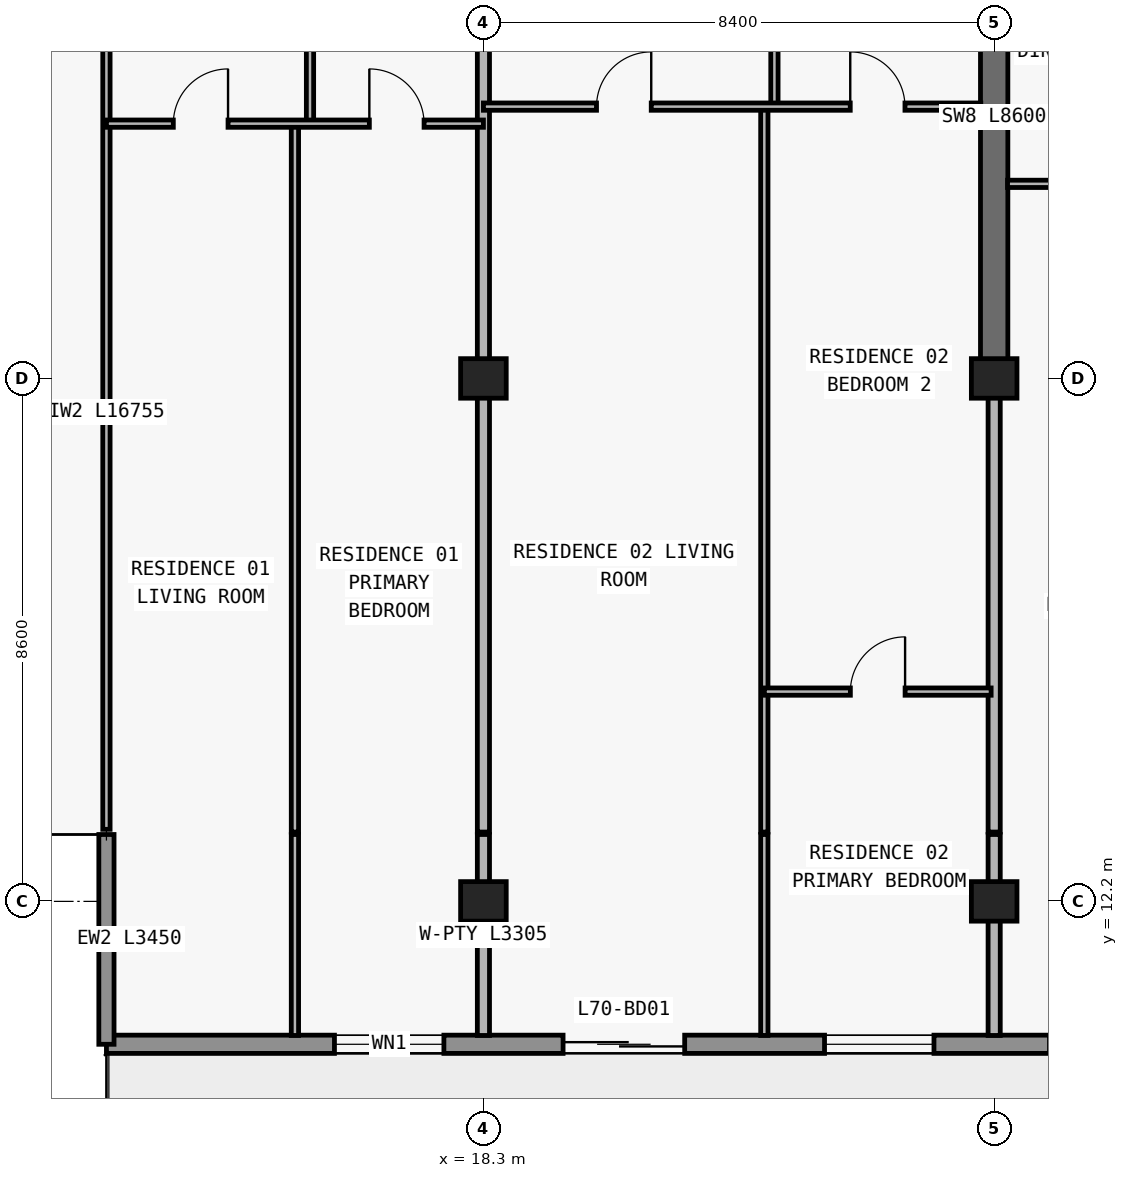
"""IFC4 building model, lengths in metres.
Left out: names, types, materials, properties, quantities, classifications, styles, units other than length and angle.
Written with IfcOpenShell. Run it as: python <this file> out.ifc"""

import sys

from ifc_helpers import new_model, si_unit, direction, frame, frame_2d, origin, origin_2d, place, context, subcontext, project, spatial, rectangle, extrude, element, fill, save


model = new_model("IFC4")
c1 = context("Model", 3, precision=1e-05, world=origin(), true_north=direction((0.0, 1.0)))
c2 = subcontext(c1, "Body", "Model", "MODEL_VIEW")
j1 = project(units=[si_unit("LENGTHUNIT", "METRE"), si_unit("PLANEANGLEUNIT", "RADIAN")], contexts=[c1])
p1 = place(None, origin())
s1 = spatial("IfcSite", under=j1, at=p1, CompositionType="ELEMENT")
p2 = place(p1, origin())
s2 = spatial("IfcBuilding", under=s1, at=p2, CompositionType="ELEMENT")
p3 = place(p2, frame((0.0, 0.0, 249.6)))
s3 = spatial("IfcBuildingStorey", under=s2, at=p3, CompositionType="ELEMENT", Elevation=249.6)
for number, where, z_axis, x_axis in (
    (1, (18.3, 12.2, 0.0), (0.0, 0.0, 1.0), (1.0, 0.0, 0.0)),
    (2, (26.7, 12.2, 0.0), (0.0, 0.0, 1.0), (1.0, 0.0, 0.0)),
    (3, (18.3, 20.8, 0.0), (0.0, 0.0, 1.0), (1.0, 0.0, 0.0)),
    (4, (26.7, 20.8, 0.0), (0.0, 0.0, 1.0), (1.0, 0.0, 0.0)),
):
    element("IfcColumn", number, at=place(p3, frame(where, z_axis=z_axis, x_axis=x_axis)), inside=s3, PredefinedType="COLUMN", context=c2, shape_type="SweptSolid", body=[
        extrude(rectangle(XDim=0.75, YDim=0.65, at=origin_2d()), origin(), (0.0, 0.0, 1.0), 3.05),
    ])
p4 = place(p3, frame((26.7, 20.8, 0.0), z_axis=(0.0, 0.0, 1.0), x_axis=(0.0, 1.0, 0.0)))
e5 = element("IfcWall", 5, at=p4, inside=s3, PredefinedType="SHEAR", context=c2, shape_type="SweptSolid", body=[
    extrude(rectangle(XDim=8.6, YDim=0.45, at=frame_2d((4.3, 0.0))), origin(), (0.0, 0.0, 1.0), 3.05),
])
p5 = place(p3, frame((65.7, 9.85, 0.0), z_axis=(0.0, 0.0, 1.0), x_axis=(-1.0, 0.0, 0.0)))
e6 = element("IfcWall", 6, at=p5, inside=s3, PredefinedType="STANDARD", context=c2, shape_type="SweptSolid", body=[
    extrude(rectangle(XDim=53.6, YDim=0.3, at=frame_2d((26.8, 0.0))), origin(), (0.0, 0.0, 1.0), 3.05),
])
p6 = place(p5, frame((48.05, 0.0, 0.85)))
e7 = element("IfcOpeningElement", 7, at=p6, cuts=e6, PredefinedType="OPENING", context=c2, shape_type="SweptSolid", body=[
    extrude(rectangle(XDim=1.8, YDim=1.55, at=frame_2d((0.9, 0.775))), frame((0.0, 0.16, 0.0), z_axis=(0.0, -1.0, 0.0), x_axis=(1.0, 0.0, 0.0)), (0.0, 0.0, 1.0), 0.32),
])
p7 = place(p5, frame((44.09, 0.0, 0.0)))
e8 = element("IfcOpeningElement", 8, at=p7, cuts=e6, PredefinedType="OPENING", context=c2, shape_type="SweptSolid", body=[
    extrude(rectangle(XDim=2.0, YDim=2.3, at=frame_2d((1.0, 1.15))), frame((0.0, 0.16, 0.0), z_axis=(0.0, -1.0, 0.0), x_axis=(1.0, 0.0, 0.0)), (0.0, 0.0, 1.0), 0.32),
])
p8 = place(p5, frame((39.99, 0.0, 0.85)))
e9 = element("IfcOpeningElement", 9, at=p8, cuts=e6, PredefinedType="OPENING", context=c2, shape_type="SweptSolid", body=[
    extrude(rectangle(XDim=1.8, YDim=1.55, at=frame_2d((0.9, 0.775))), frame((0.0, 0.16, 0.0), z_axis=(0.0, -1.0, 0.0), x_axis=(1.0, 0.0, 0.0)), (0.0, 0.0, 1.0), 0.32),
])
p9 = place(p5, frame((36.09, 0.0, 0.0)))
e10 = element("IfcOpeningElement", 10, at=p9, cuts=e6, PredefinedType="OPENING", context=c2, shape_type="SweptSolid", body=[
    extrude(rectangle(XDim=2.0, YDim=2.3, at=frame_2d((1.0, 1.15))), frame((0.0, 0.16, 0.0), z_axis=(0.0, -1.0, 0.0), x_axis=(1.0, 0.0, 0.0)), (0.0, 0.0, 1.0), 0.32),
])
p10 = place(p5, frame((31.41, 0.0, 0.65)))
e11 = element("IfcOpeningElement", 11, at=p10, cuts=e6, PredefinedType="OPENING", context=c2, shape_type="SweptSolid", body=[
    extrude(rectangle(XDim=2.6, YDim=1.85, at=frame_2d((1.3, 0.925))), frame((0.0, 0.16, 0.0), z_axis=(0.0, -1.0, 0.0), x_axis=(1.0, 0.0, 0.0)), (0.0, 0.0, 1.0), 0.32),
])
p11 = place(p5, frame((25.7, 0.0, 0.85)))
e12 = element("IfcOpeningElement", 12, at=p11, cuts=e6, PredefinedType="OPENING", context=c2, shape_type="SweptSolid", body=[
    extrude(rectangle(XDim=2.2, YDim=1.55, at=frame_2d((1.1, 0.775))), frame((0.0, 0.16, 0.0), z_axis=(0.0, -1.0, 0.0), x_axis=(1.0, 0.0, 0.0)), (0.0, 0.0, 1.0), 0.32),
])
p12 = place(p5, frame((17.7, 0.0, 0.85)))
e13 = element("IfcOpeningElement", 13, at=p12, cuts=e6, PredefinedType="OPENING", context=c2, shape_type="SweptSolid", body=[
    extrude(rectangle(XDim=2.2, YDim=1.55, at=frame_2d((1.1, 0.775))), frame((0.0, 0.16, 0.0), z_axis=(0.0, -1.0, 0.0), x_axis=(1.0, 0.0, 0.0)), (0.0, 0.0, 1.0), 0.32),
])
p13 = place(p5, frame((11.69, 0.0, 0.0)))
e14 = element("IfcOpeningElement", 14, at=p13, cuts=e6, PredefinedType="OPENING", context=c2, shape_type="SweptSolid", body=[
    extrude(rectangle(XDim=2.0, YDim=2.3, at=frame_2d((1.0, 1.15))), frame((0.0, 0.16, 0.0), z_axis=(0.0, -1.0, 0.0), x_axis=(1.0, 0.0, 0.0)), (0.0, 0.0, 1.0), 0.32),
])
p14 = place(p5, frame((7.01, 0.0, 0.65)))
e15 = element("IfcOpeningElement", 15, at=p14, cuts=e6, PredefinedType="OPENING", context=c2, shape_type="SweptSolid", body=[
    extrude(rectangle(XDim=2.6, YDim=1.85, at=frame_2d((1.3, 0.925))), frame((0.0, 0.16, 0.0), z_axis=(0.0, -1.0, 0.0), x_axis=(1.0, 0.0, 0.0)), (0.0, 0.0, 1.0), 0.32),
])
p15 = place(p5, frame((2.0, 0.0, 0.85)))
e16 = element("IfcOpeningElement", 16, at=p15, cuts=e6, PredefinedType="OPENING", context=c2, shape_type="SweptSolid", body=[
    extrude(rectangle(XDim=2.2, YDim=1.55, at=frame_2d((1.1, 0.775))), frame((0.0, 0.16, 0.0), z_axis=(0.0, -1.0, 0.0), x_axis=(1.0, 0.0, 0.0)), (0.0, 0.0, 1.0), 0.32),
])
p16 = place(p3, frame((12.1, 13.3, 0.0), z_axis=(0.0, 0.0, 1.0), x_axis=(0.0, -1.0, 0.0)))
e17 = element("IfcWall", 17, at=p16, inside=s3, PredefinedType="ELEMENTEDWALL", context=c2, shape_type="SweptSolid", body=[
    extrude(rectangle(XDim=3.45, YDim=0.25, at=frame_2d((1.725, 0.0))), origin(), (0.0, 0.0, 1.0), 3.05),
])
p17 = place(p3, frame((12.1, 13.385, 0.0), z_axis=(0.0, 0.0, 1.0), x_axis=(0.0, 1.0, 0.0)))
e18 = element("IfcWall", 18, at=p17, inside=s3, PredefinedType="PARTITIONING", context=c2, shape_type="SweptSolid", body=[
    extrude(rectangle(XDim=16.755, YDim=0.12, at=frame_2d((8.377, 0.0))), origin(), (0.0, 0.0, 1.0), 2.578),
])
p18 = place(p17, frame((13.73, 0.0, 0.0)))
e19 = element("IfcOpeningElement", 19, at=p18, cuts=e18, PredefinedType="OPENING", context=c2, shape_type="SweptSolid", body=[
    extrude(rectangle(XDim=0.9, YDim=2.15, at=frame_2d((0.45, 1.075))), frame((0.0, 0.07, 0.0), z_axis=(0.0, -1.0, 0.0), x_axis=(1.0, 0.0, 0.0)), (0.0, 0.0, 1.0), 0.14),
])
p19 = place(p3, frame((15.2, 9.995, 0.0), z_axis=(0.0, 0.0, 1.0), x_axis=(0.0, 1.0, 0.0)))
e20 = element("IfcWall", 20, at=p19, inside=s3, PredefinedType="PARTITIONING", context=c2, shape_type="SweptSolid", body=[
    extrude(rectangle(XDim=3.305, YDim=0.12, at=frame_2d((1.652, 0.0))), origin(), (0.0, 0.0, 1.0), 3.05),
])
p20 = place(p3, frame((15.2, 13.34, 0.0), z_axis=(0.0, 0.0, 1.0), x_axis=(0.0, 1.0, 0.0)))
e21 = element("IfcWall", 21, at=p20, inside=s3, PredefinedType="PARTITIONING", context=c2, shape_type="SweptSolid", body=[
    extrude(rectangle(XDim=11.65, YDim=0.12, at=frame_2d((5.825, 0.0))), origin(), (0.0, 0.0, 1.0), 3.05),
])
p21 = place(p3, frame((15.448, 24.99, 0.0), z_axis=(0.0, 0.0, 1.0), x_axis=(0.0, 1.0, 0.0)))
e22 = element("IfcWall", 22, at=p21, inside=s3, PredefinedType="PARTITIONING", context=c2, shape_type="SweptSolid", body=[
    extrude(rectangle(XDim=5.15, YDim=0.12, at=frame_2d((2.575, 0.0))), origin(), (0.0, 0.0, 1.0), 3.05),
])
p22 = place(p21, frame((2.125, 0.0, 0.0)))
e23 = element("IfcOpeningElement", 23, at=p22, cuts=e22, PredefinedType="OPENING", context=c2, shape_type="SweptSolid", body=[
    extrude(rectangle(XDim=0.9, YDim=2.15, at=frame_2d((0.45, 1.075))), frame((0.0, 0.07, 0.0), z_axis=(0.0, -1.0, 0.0), x_axis=(1.0, 0.0, 0.0)), (0.0, 0.0, 1.0), 0.14),
])
p23 = place(p3, frame((18.3, 9.995, 0.0), z_axis=(0.0, 0.0, 1.0), x_axis=(0.0, 1.0, 0.0)))
e24 = element("IfcWall", 24, at=p23, inside=s3, PredefinedType="PARTITIONING", context=c2, shape_type="SweptSolid", body=[
    extrude(rectangle(XDim=3.305, YDim=0.2, at=frame_2d((1.652, 0.0))), origin(), (0.0, 0.0, 1.0), 2.263),
])
p24 = place(p3, frame((18.3, 13.34, 0.0), z_axis=(0.0, 0.0, 1.0), x_axis=(0.0, 1.0, 0.0)))
e25 = element("IfcWall", 25, at=p24, inside=s3, PredefinedType="PARTITIONING", context=c2, shape_type="SweptSolid", body=[
    extrude(rectangle(XDim=16.8, YDim=0.2, at=frame_2d((8.4, 0.0))), origin(), (0.0, 0.0, 1.0), 2.263),
])
p25 = place(p3, frame((22.92, 9.995, 0.0), z_axis=(0.0, 0.0, 1.0), x_axis=(0.0, 1.0, 0.0)))
e26 = element("IfcWall", 26, at=p25, inside=s3, PredefinedType="PARTITIONING", context=c2, shape_type="SweptSolid", body=[
    extrude(rectangle(XDim=3.305, YDim=0.12, at=frame_2d((1.652, 0.0))), origin(), (0.0, 0.0, 1.0), 3.05),
])
p26 = place(p3, frame((22.92, 13.34, 0.0), z_axis=(0.0, 0.0, 1.0), x_axis=(0.0, 1.0, 0.0)))
e27 = element("IfcWall", 27, at=p26, inside=s3, PredefinedType="PARTITIONING", context=c2, shape_type="SweptSolid", body=[
    extrude(rectangle(XDim=11.93, YDim=0.12, at=frame_2d((5.965, 0.0))), origin(), (0.0, 0.0, 1.0), 3.05),
])
p27 = place(p3, frame((23.086, 25.275, 0.0), z_axis=(0.0, 0.0, 1.0), x_axis=(0.0, 1.0, 0.0)))
e28 = element("IfcWall", 28, at=p27, inside=s3, PredefinedType="PARTITIONING", context=c2, shape_type="SweptSolid", body=[
    extrude(rectangle(XDim=4.865, YDim=0.12, at=frame_2d((2.433, 0.0))), origin(), (0.0, 0.0, 1.0), 3.05),
])
p28 = place(p27, frame((1.982, 0.0, 0.0)))
e29 = element("IfcOpeningElement", 29, at=p28, cuts=e28, PredefinedType="OPENING", context=c2, shape_type="SweptSolid", body=[
    extrude(rectangle(XDim=0.9, YDim=2.15, at=frame_2d((0.45, 1.075))), frame((0.0, 0.07, 0.0), z_axis=(0.0, -1.0, 0.0), x_axis=(1.0, 0.0, 0.0)), (0.0, 0.0, 1.0), 0.14),
])
p29 = place(p3, frame((26.7, 9.995, 0.0), z_axis=(0.0, 0.0, 1.0), x_axis=(0.0, 1.0, 0.0)))
e30 = element("IfcWall", 30, at=p29, inside=s3, PredefinedType="PARTITIONING", context=c2, shape_type="SweptSolid", body=[
    extrude(rectangle(XDim=3.305, YDim=0.2, at=frame_2d((1.652, 0.0))), origin(), (0.0, 0.0, 1.0), 2.263),
])
p30 = place(p3, frame((26.7, 13.34, 0.0), z_axis=(0.0, 0.0, 1.0), x_axis=(0.0, 1.0, 0.0)))
e31 = element("IfcWall", 31, at=p30, inside=s3, PredefinedType="PARTITIONING", context=c2, shape_type="SweptSolid", body=[
    extrude(rectangle(XDim=7.455, YDim=0.2, at=frame_2d((3.728, 0.0))), origin(), (0.0, 0.0, 1.0), 2.263),
])
p31 = place(p3, frame((22.92, 15.65, 0.0), z_axis=(0.0, 0.0, 1.0), x_axis=(1.0, 0.0, 0.0)))
e32 = element("IfcWall", 32, at=p31, inside=s3, PredefinedType="PARTITIONING", context=c2, shape_type="SweptSolid", body=[
    extrude(rectangle(XDim=3.73, YDim=0.12, at=frame_2d((1.865, 0.0))), origin(), (0.0, 0.0, 1.0), 3.05),
])
p32 = place(p31, frame((1.415, 0.0, 0.0)))
e33 = element("IfcOpeningElement", 33, at=p32, cuts=e32, PredefinedType="OPENING", context=c2, shape_type="SweptSolid", body=[
    extrude(rectangle(XDim=0.9, YDim=2.15, at=frame_2d((0.45, 1.075))), frame((0.0, 0.07, 0.0), z_axis=(0.0, -1.0, 0.0), x_axis=(1.0, 0.0, 0.0)), (0.0, 0.0, 1.0), 0.14),
])
p33 = place(p3, frame((26.92, 24.0, 0.0), z_axis=(0.0, 0.0, 1.0), x_axis=(1.0, 0.0, 0.0)))
e34 = element("IfcWall", 34, at=p33, inside=s3, PredefinedType="PARTITIONING", context=c2, shape_type="SweptSolid", body=[
    extrude(rectangle(XDim=8.18, YDim=0.12, at=frame_2d((4.09, 0.0))), origin(), (0.0, 0.0, 1.0), 3.05),
])
p34 = place(p33, frame((1.33, 0.0, 0.0)))
e35 = element("IfcOpeningElement", 35, at=p34, cuts=e34, PredefinedType="OPENING", context=c2, shape_type="SweptSolid", body=[
    extrude(rectangle(XDim=0.9, YDim=2.15, at=frame_2d((0.45, 1.075))), frame((0.0, 0.07, 0.0), z_axis=(0.0, -1.0, 0.0), x_axis=(1.0, 0.0, 0.0)), (0.0, 0.0, 1.0), 0.14),
])
p35 = place(p3, frame((12.1, 24.99, 0.0), z_axis=(0.0, 0.0, 1.0), x_axis=(1.0, 0.0, 0.0)))
e36 = element("IfcWall", 36, at=p35, inside=s3, PredefinedType="PARTITIONING", context=c2, shape_type="SweptSolid", body=[
    extrude(rectangle(XDim=6.2, YDim=0.12, at=frame_2d((3.1, 0.0))), origin(), (0.0, 0.0, 1.0), 3.05),
])
p36 = place(p35, frame((1.1, 0.0, 0.0)))
e37 = element("IfcOpeningElement", 37, at=p36, cuts=e36, PredefinedType="OPENING", context=c2, shape_type="SweptSolid", body=[
    extrude(rectangle(XDim=0.9, YDim=2.15, at=frame_2d((0.45, 1.075))), frame((0.0, 0.07, 0.0), z_axis=(0.0, -1.0, 0.0), x_axis=(1.0, 0.0, 0.0)), (0.0, 0.0, 1.0), 0.14),
])
p37 = place(p35, frame((4.324, 0.0, 0.0)))
e38 = element("IfcOpeningElement", 38, at=p37, cuts=e36, PredefinedType="OPENING", context=c2, shape_type="SweptSolid", body=[
    extrude(rectangle(XDim=0.9, YDim=2.15, at=frame_2d((0.45, 1.075))), frame((0.0, 0.07, 0.0), z_axis=(0.0, -1.0, 0.0), x_axis=(1.0, 0.0, 0.0)), (0.0, 0.0, 1.0), 0.14),
])
p38 = place(p3, frame((18.3, 25.27, 0.0), z_axis=(0.0, 0.0, 1.0), x_axis=(1.0, 0.0, 0.0)))
e39 = element("IfcWall", 39, at=p38, inside=s3, PredefinedType="PARTITIONING", context=c2, shape_type="SweptSolid", body=[
    extrude(rectangle(XDim=8.18, YDim=0.12, at=frame_2d((4.09, 0.0))), origin(), (0.0, 0.0, 1.0), 3.05),
])
p39 = place(p38, frame((1.86, 0.0, 0.0)))
e40 = element("IfcOpeningElement", 40, at=p39, cuts=e39, PredefinedType="OPENING", context=c2, shape_type="SweptSolid", body=[
    extrude(rectangle(XDim=0.9, YDim=2.15, at=frame_2d((0.45, 1.075))), frame((0.0, 0.07, 0.0), z_axis=(0.0, -1.0, 0.0), x_axis=(1.0, 0.0, 0.0)), (0.0, 0.0, 1.0), 0.14),
])
p40 = place(p38, frame((6.033, 0.0, 0.0)))
e41 = element("IfcOpeningElement", 41, at=p40, cuts=e39, PredefinedType="OPENING", context=c2, shape_type="SweptSolid", body=[
    extrude(rectangle(XDim=0.9, YDim=2.15, at=frame_2d((0.45, 1.075))), frame((0.0, 0.07, 0.0), z_axis=(0.0, -1.0, 0.0), x_axis=(1.0, 0.0, 0.0)), (0.0, 0.0, 1.0), 0.14),
])
p41 = place(p6, origin())
e42 = element("IfcWindow", 42, at=p41, inside=s3, PartitioningType="SINGLE_PANEL", PredefinedType="WINDOW", context=c2, shape_type="SweptSolid", body=[
    extrude(rectangle(XDim=1.8, YDim=1.55, at=frame_2d((0.9, 0.775))), frame((0.0, 0.03, 0.0), z_axis=(0.0, -1.0, 0.0), x_axis=(1.0, 0.0, 0.0)), (0.0, 0.0, 1.0), 0.06),
])
fill(e7, e42)
p42 = place(p7, origin())
e43 = element("IfcDoor", 43, at=p42, inside=s3, OperationType="DOUBLE_DOOR_SLIDING", PredefinedType="DOOR", context=c2, shape_type="SweptSolid", body=[
    extrude(rectangle(XDim=2.0, YDim=2.3, at=frame_2d((1.0, 1.15))), frame((0.0, 0.025, 0.0), z_axis=(0.0, -1.0, 0.0), x_axis=(1.0, 0.0, 0.0)), (0.0, 0.0, 1.0), 0.05),
])
fill(e8, e43)
p43 = place(p8, origin())
e44 = element("IfcWindow", 44, at=p43, inside=s3, PartitioningType="SINGLE_PANEL", PredefinedType="WINDOW", context=c2, shape_type="SweptSolid", body=[
    extrude(rectangle(XDim=1.8, YDim=1.55, at=frame_2d((0.9, 0.775))), frame((0.0, 0.03, 0.0), z_axis=(0.0, -1.0, 0.0), x_axis=(1.0, 0.0, 0.0)), (0.0, 0.0, 1.0), 0.06),
])
fill(e9, e44)
p44 = place(p36, origin())
e45 = element("IfcDoor", 45, at=p44, inside=s3, OperationType="SINGLE_SWING_RIGHT", PredefinedType="DOOR", context=c2, shape_type="SweptSolid", body=[
    extrude(rectangle(XDim=0.9, YDim=2.15, at=frame_2d((0.45, 1.075))), frame((0.0, 0.025, 0.0), z_axis=(0.0, -1.0, 0.0), x_axis=(1.0, 0.0, 0.0)), (0.0, 0.0, 1.0), 0.05),
])
fill(e37, e45)
p45 = place(p37, origin())
e46 = element("IfcDoor", 46, at=p45, inside=s3, OperationType="SINGLE_SWING_LEFT", PredefinedType="DOOR", context=c2, shape_type="SweptSolid", body=[
    extrude(rectangle(XDim=0.9, YDim=2.15, at=frame_2d((0.45, 1.075))), frame((0.0, 0.025, 0.0), z_axis=(0.0, -1.0, 0.0), x_axis=(1.0, 0.0, 0.0)), (0.0, 0.0, 1.0), 0.05),
])
fill(e38, e46)
p46 = place(p39, origin())
e47 = element("IfcDoor", 47, at=p46, inside=s3, OperationType="SINGLE_SWING_RIGHT", PredefinedType="DOOR", context=c2, shape_type="SweptSolid", body=[
    extrude(rectangle(XDim=0.9, YDim=2.15, at=frame_2d((0.45, 1.075))), frame((0.0, 0.025, 0.0), z_axis=(0.0, -1.0, 0.0), x_axis=(1.0, 0.0, 0.0)), (0.0, 0.0, 1.0), 0.05),
])
fill(e40, e47)
p47 = place(p40, origin())
e48 = element("IfcDoor", 48, at=p47, inside=s3, OperationType="SINGLE_SWING_LEFT", PredefinedType="DOOR", context=c2, shape_type="SweptSolid", body=[
    extrude(rectangle(XDim=0.9, YDim=2.15, at=frame_2d((0.45, 1.075))), frame((0.0, 0.025, 0.0), z_axis=(0.0, -1.0, 0.0), x_axis=(1.0, 0.0, 0.0)), (0.0, 0.0, 1.0), 0.05),
])
fill(e41, e48)
p48 = place(p32, origin())
e49 = element("IfcDoor", 49, at=p48, inside=s3, OperationType="SINGLE_SWING_RIGHT", PredefinedType="DOOR", context=c2, shape_type="SweptSolid", body=[
    extrude(rectangle(XDim=0.9, YDim=2.15, at=frame_2d((0.45, 1.075))), frame((0.0, 0.025, 0.0), z_axis=(0.0, -1.0, 0.0), x_axis=(1.0, 0.0, 0.0)), (0.0, 0.0, 1.0), 0.05),
])
fill(e33, e49)
save(model, sys.argv[1])
